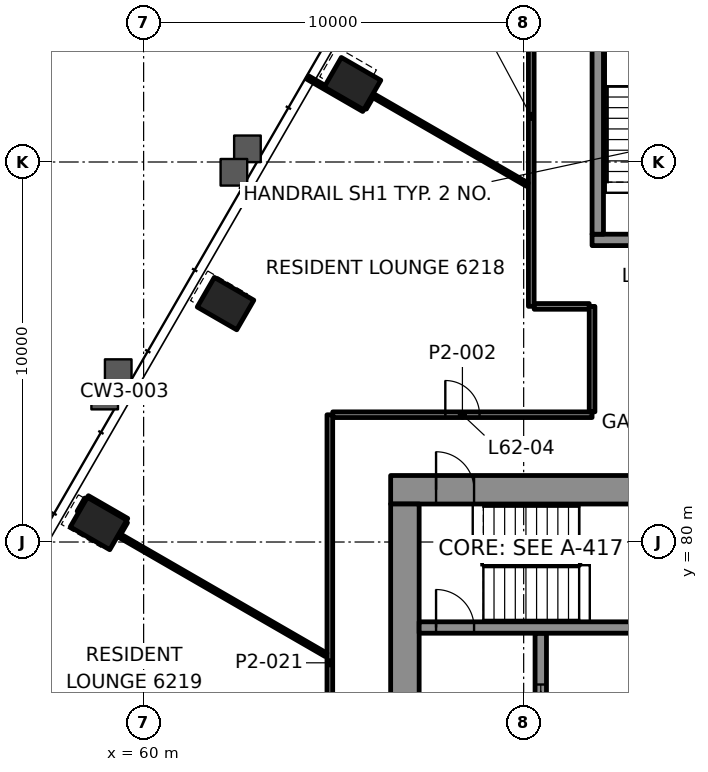
"""IFC4 building model, lengths in metres.
Left out: names, types, materials, properties, quantities, classifications, styles, units other than length and angle.
Written with IfcOpenShell. Run it as: python <this file> out.ifc"""

import sys

from ifc_helpers import new_model, si_unit, direction, frame, frame_2d, origin, origin_2d, place, context, subcontext, project, spatial, rectangle, hollow_rectangle, extrude, element, fill, save


model = new_model("IFC4")
c1 = context("Model", 3, precision=1e-05, world=origin(), true_north=direction((0.0, 1.0)))
c2 = subcontext(c1, "Body", "Model", "MODEL_VIEW")
j1 = project(units=[si_unit("LENGTHUNIT", "METRE"), si_unit("PLANEANGLEUNIT", "RADIAN")], contexts=[c1])
p1 = place(None, origin())
s1 = spatial("IfcSite", under=j1, at=p1, CompositionType="ELEMENT")
p2 = place(p1, origin())
s2 = spatial("IfcBuilding", under=s1, at=p2, CompositionType="ELEMENT")
p3 = place(p2, frame((0.0, 0.0, 263.6)))
s3 = spatial("IfcBuildingStorey", under=s2, at=p3, CompositionType="ELEMENT", Elevation=263.6)
for number, where, z_axis, x_axis in (
    (1, (65.497, 92.062, -0.0), (0.0, 0.0, 1.0), (-0.5, -0.866, 0.0)),
    (2, (62.156, 86.274, -0.0), (0.0, 0.0, 1.0), (-0.5, -0.866, 0.0)),
    (3, (58.814, 80.487, -0.0), (0.0, 0.0, 1.0), (-0.5, -0.866, 0.0)),
):
    element("IfcColumn", number, at=place(p3, frame(where, z_axis=z_axis, x_axis=x_axis)), inside=s3, PredefinedType="COLUMN", context=c2, shape_type="SweptSolid", body=[
        extrude(hollow_rectangle(XDim=0.9, YDim=1.2, WallThickness=0.06, at=origin_2d()), origin(), (0.0, 0.0, 1.0), 3.5),
    ])
p4 = place(p3, frame((66.5, 81.375, 0.0), z_axis=(0.0, 0.0, 1.0), x_axis=(1.0, 0.0, 0.0)))
e4 = element("IfcWall", 4, at=p4, inside=s3, PredefinedType="SHEAR", context=c2, shape_type="SweptSolid", body=[
    extrude(rectangle(XDim=17.0, YDim=0.75, at=frame_2d((8.5, 0.0))), origin(), (0.0, 0.0, 1.0), 3.3),
])
p5 = place(p4, frame((1.195, 0.0, 0.0)))
e5 = element("IfcOpeningElement", 5, at=p5, cuts=e4, PredefinedType="OPENING", context=c2, shape_type="SweptSolid", body=[
    extrude(rectangle(XDim=1.0, YDim=2.1, at=frame_2d((0.5, 1.05))), frame((0.0, 0.385, 0.0), z_axis=(0.0, -1.0, 0.0), x_axis=(1.0, 0.0, 0.0)), (0.0, 0.0, 1.0), 0.77),
])
p6 = place(p4, frame((15.005, 0.0, 0.0)))
e6 = element("IfcOpeningElement", 6, at=p6, cuts=e4, PredefinedType="OPENING", context=c2, shape_type="SweptSolid", body=[
    extrude(rectangle(XDim=1.0, YDim=2.1, at=frame_2d((0.5, 1.05))), frame((0.0, 0.385, 0.0), z_axis=(0.0, -1.0, 0.0), x_axis=(1.0, 0.0, 0.0)), (0.0, 0.0, 1.0), 0.77),
])
p7 = place(p4, frame((8.15, 0.0, 0.0)))
e7 = element("IfcOpeningElement", 7, at=p7, cuts=e4, PredefinedType="OPENING", context=c2, shape_type="SweptSolid", body=[
    extrude(rectangle(XDim=0.9, YDim=2.1, at=frame_2d((0.45, 1.05))), frame((0.0, 0.385, 0.0), z_axis=(0.0, -1.0, 0.0), x_axis=(1.0, 0.0, 0.0)), (0.0, 0.0, 1.0), 0.77),
])
p8 = place(p3, frame((66.875, 69.0, 0.0), z_axis=(0.0, 0.0, 1.0), x_axis=(0.0, 1.0, 0.0)))
e8 = element("IfcWall", 8, at=p8, inside=s3, PredefinedType="SHEAR", context=c2, shape_type="SweptSolid", body=[
    extrude(rectangle(XDim=12.0, YDim=0.75, at=frame_2d((6.0, 0.0))), origin(), (0.0, 0.0, 1.0), 3.3),
])
p9 = place(p8, frame((3.7, 0.0, 0.0)))
e9 = element("IfcOpeningElement", 9, at=p9, cuts=e8, PredefinedType="OPENING", context=c2, shape_type="SweptSolid", body=[
    extrude(rectangle(XDim=1.2, YDim=2.1, at=frame_2d((0.6, 1.05))), frame((0.0, 0.385, 0.0), z_axis=(0.0, -1.0, 0.0), x_axis=(1.0, 0.0, 0.0)), (0.0, 0.0, 1.0), 0.77),
])
p10 = place(p8, frame((0.925, 0.0, 0.0)))
e10 = element("IfcOpeningElement", 10, at=p10, cuts=e8, PredefinedType="OPENING", context=c2, shape_type="SweptSolid", body=[
    extrude(rectangle(XDim=0.9, YDim=2.1, at=frame_2d((0.45, 1.05))), frame((0.0, 0.385, 0.0), z_axis=(0.0, -1.0, 0.0), x_axis=(1.0, 0.0, 0.0)), (0.0, 0.0, 1.0), 0.77),
])
p11 = place(p3, frame((70.45, 75.0, 0.0), z_axis=(0.0, 0.0, 1.0), x_axis=(0.0, 1.0, 0.0)))
e11 = element("IfcWall", 11, at=p11, inside=s3, PredefinedType="SHEAR", context=c2, shape_type="SweptSolid", body=[
    extrude(rectangle(XDim=2.6, YDim=0.3, at=frame_2d((1.3, 0.0))), origin(), (0.0, 0.0, 1.0), 3.3),
])
p12 = place(p11, frame((0.15, 0.0, 0.0)))
e12 = element("IfcOpeningElement", 12, at=p12, cuts=e11, PredefinedType="OPENING", context=c2, shape_type="SweptSolid", body=[
    extrude(rectangle(XDim=1.1, YDim=2.1, at=frame_2d((0.55, 1.05))), frame((0.0, 0.16, 0.0), z_axis=(0.0, -1.0, 0.0), x_axis=(1.0, 0.0, 0.0)), (0.0, 0.0, 1.0), 0.32),
])
p13 = place(p3, frame((67.25, 77.75, 0.0), z_axis=(0.0, 0.0, 1.0), x_axis=(1.0, 0.0, 0.0)))
e13 = element("IfcWall", 13, at=p13, inside=s3, PredefinedType="SHEAR", context=c2, shape_type="SweptSolid", body=[
    extrude(rectangle(XDim=15.5, YDim=0.3, at=frame_2d((7.75, 0.0))), origin(), (0.0, 0.0, 1.0), 3.3),
])
p14 = place(p13, frame((0.445, 0.0, 0.0)))
e14 = element("IfcOpeningElement", 14, at=p14, cuts=e13, PredefinedType="OPENING", context=c2, shape_type="SweptSolid", body=[
    extrude(rectangle(XDim=1.0, YDim=2.1, at=frame_2d((0.5, 1.05))), frame((0.0, 0.16, 0.0), z_axis=(0.0, -1.0, 0.0), x_axis=(1.0, 0.0, 0.0)), (0.0, 0.0, 1.0), 0.32),
])
p15 = place(p3, frame((71.8, 87.95, 0.0), z_axis=(0.0, 0.0, 1.0), x_axis=(1.0, 0.0, 0.0)))
e15 = element("IfcWall", 15, at=p15, inside=s3, PredefinedType="SHEAR", context=c2, shape_type="SweptSolid", body=[
    extrude(rectangle(XDim=6.4, YDim=0.3, at=frame_2d((3.2, 0.0))), origin(), (0.0, 0.0, 1.0), 3.3),
])
p16 = place(p15, frame((1.325, 0.0, 0.0)))
e16 = element("IfcOpeningElement", 16, at=p16, cuts=e15, PredefinedType="OPENING", context=c2, shape_type="SweptSolid", body=[
    extrude(rectangle(XDim=1.0, YDim=2.1, at=frame_2d((0.5, 1.05))), frame((0.0, 0.16, 0.0), z_axis=(0.0, -1.0, 0.0), x_axis=(1.0, 0.0, 0.0)), (0.0, 0.0, 1.0), 0.32),
])
p17 = place(p15, frame((4.125, 0.0, 0.0)))
e17 = element("IfcOpeningElement", 17, at=p17, cuts=e15, PredefinedType="OPENING", context=c2, shape_type="SweptSolid", body=[
    extrude(rectangle(XDim=1.2, YDim=2.1, at=frame_2d((0.6, 1.05))), frame((0.0, 0.16, 0.0), z_axis=(0.0, -1.0, 0.0), x_axis=(1.0, 0.0, 0.0)), (0.0, 0.0, 1.0), 0.32),
])
p18 = place(p3, frame((71.95, 88.1, 0.0), z_axis=(0.0, 0.0, 1.0), x_axis=(0.0, 1.0, 0.0)))
e18 = element("IfcWall", 18, at=p18, inside=s3, PredefinedType="SHEAR", context=c2, shape_type="SweptSolid", body=[
    extrude(rectangle(XDim=6.2, YDim=0.3, at=frame_2d((3.1, 0.0))), origin(), (0.0, 0.0, 1.0), 3.3),
])
p19 = place(p3, frame((64.977, 83.35, 0.0), z_axis=(0.0, 0.0, 1.0), x_axis=(1.0, 0.0, 0.0)))
e19 = element("IfcWall", 19, at=p19, inside=s3, PredefinedType="PARTITIONING", context=c2, shape_type="SweptSolid", body=[
    extrude(rectangle(XDim=6.823, YDim=0.15, at=frame_2d((3.412, 0.0))), origin(), (0.0, 0.0, 1.0), 2.7),
])
p20 = place(p19, frame((2.961, 0.0, 0.0)))
e20 = element("IfcOpeningElement", 20, at=p20, cuts=e19, PredefinedType="OPENING", context=c2, shape_type="SweptSolid", body=[
    extrude(rectangle(XDim=0.9, YDim=2.1, at=frame_2d((0.45, 1.05))), frame((0.0, 0.085, 0.0), z_axis=(0.0, -1.0, 0.0), x_axis=(1.0, 0.0, 0.0)), (0.0, 0.0, 1.0), 0.17),
])
p21 = place(p3, frame((70.277, 86.2, 0.0), z_axis=(0.0, 0.0, 1.0), x_axis=(1.0, 0.0, 0.0)))
e21 = element("IfcWall", 21, at=p21, inside=s3, PredefinedType="PARTITIONING", context=c2, shape_type="SweptSolid", body=[
    extrude(rectangle(XDim=1.448, YDim=0.15, at=frame_2d((0.724, 0.0))), origin(), (0.0, 0.0, 1.0), 2.7),
])
p22 = place(p3, frame((59.359, 80.23, 0.0), z_axis=(0.0, 0.0, 1.0), x_axis=(0.499539972301, 0.866290838041, 0.0)))
e22 = element("IfcWall", 22, at=p22, inside=s3, PredefinedType="PARTITIONING", context=c2, shape_type="SweptSolid", body=[
    extrude(rectangle(XDim=0.347, YDim=0.1, at=frame_2d((0.174, 0.0))), origin(), (0.0, 0.0, 1.0), 2.7),
])
p23 = place(p3, frame((65.817, 91.417, 0.0), z_axis=(0.0, 0.0, 1.0), x_axis=(0.499985493453, 0.866033778982, 0.0)))
e23 = element("IfcWall", 23, at=p23, inside=s3, PredefinedType="PARTITIONING", context=c2, shape_type="SweptSolid", body=[
    extrude(rectangle(XDim=0.348, YDim=0.1, at=frame_2d((0.174, 0.0))), origin(), (0.0, 0.0, 1.0), 2.7),
])
p24 = place(p3, frame((58.294, 80.787, 0.0), z_axis=(0.0, 0.0, 1.0), x_axis=(0.500165123728, 0.865930048564, 0.0)))
e24 = element("IfcWall", 24, at=p24, inside=s3, PredefinedType="PARTITIONING", context=c2, shape_type="SweptSolid", body=[
    extrude(rectangle(XDim=0.398, YDim=0.1, at=frame_2d((0.199, 0.0))), origin(), (0.0, 0.0, 1.0), 2.7),
])
p25 = place(p3, frame((71.8, 83.425, 0.0), z_axis=(0.0, 0.0, 1.0), x_axis=(0.0, 1.0, 0.0)))
e25 = element("IfcWall", 25, at=p25, inside=s3, PredefinedType="PARTITIONING", context=c2, shape_type="SweptSolid", body=[
    extrude(rectangle(XDim=2.775, YDim=0.15, at=frame_2d((1.387, 0.0))), origin(), (0.0, 0.0, 1.0), 2.697),
])
p26 = place(p3, frame((70.2, 86.202, 0.0), z_axis=(0.0, 0.0, 1.0), x_axis=(0.0, 1.0, 0.0)))
e26 = element("IfcWall", 26, at=p26, inside=s3, PredefinedType="PARTITIONING", context=c2, shape_type="SweptSolid", body=[
    extrude(rectangle(XDim=9.998, YDim=0.15, at=frame_2d((4.999, 0.0))), origin(), (0.0, 0.0, 1.0), 2.7),
])
p27 = place(p3, frame((64.9, 70.295, 0.0), z_axis=(0.0, 0.0, 1.0), x_axis=(0.0, 1.0, 0.0)))
e27 = element("IfcWall", 27, at=p27, inside=s3, PredefinedType="PARTITIONING", context=c2, shape_type="SweptSolid", body=[
    extrude(rectangle(XDim=13.053, YDim=0.15, at=frame_2d((6.527, 0.0))), origin(), (0.0, 0.0, 1.0), 2.7),
])
p28 = place(p27, frame((2.963, 0.0, 0.0)))
e28 = element("IfcOpeningElement", 28, at=p28, cuts=e27, PredefinedType="OPENING", context=c2, shape_type="SweptSolid", body=[
    extrude(rectangle(XDim=1.0, YDim=2.1, at=frame_2d((0.5, 1.05))), frame((0.0, 0.085, 0.0), z_axis=(0.0, -1.0, 0.0), x_axis=(1.0, 0.0, 0.0)), (0.0, 0.0, 1.0), 0.17),
])
p29 = place(p3, frame((70.099, 89.404, 0.0), z_axis=(0.0, 0.0, 1.0), x_axis=(-0.866026044032, 0.499998891056, 0.0)))
e29 = element("IfcWall", 29, at=p29, inside=s3, PredefinedType="PARTITIONING", context=c2, shape_type="SweptSolid", body=[
    extrude(rectangle(XDim=4.714, YDim=0.1, at=frame_2d((2.357, 0.0))), origin(), (0.0, 0.0, 1.0), 2.7),
])
p30 = place(p3, frame((65.79, 91.373, 0.0), z_axis=(0.0, 0.0, 1.0), x_axis=(-0.866085039529, 0.499896693632, 0.0)))
e30 = element("IfcWall", 30, at=p30, inside=s3, PredefinedType="PARTITIONING", context=c2, shape_type="SweptSolid", body=[
    extrude(rectangle(XDim=1.698, YDim=0.1, at=frame_2d((0.849, 0.0))), origin(), (0.0, 0.0, 1.0), 2.688),
])
p31 = place(p3, frame((59.557, 80.578, 0.0), z_axis=(0.0, 0.0, 1.0), x_axis=(-0.866035997947, 0.499981649923, 0.0)))
e31 = element("IfcWall", 31, at=p31, inside=s3, PredefinedType="PARTITIONING", context=c2, shape_type="SweptSolid", body=[
    extrude(rectangle(XDim=1.196, YDim=0.1, at=frame_2d((0.598, 0.0))), origin(), (0.0, 0.0, 1.0), 2.688),
])
p32 = place(p3, frame((64.799, 77.032, 0.0), z_axis=(0.0, 0.0, 1.0), x_axis=(-0.866032246126, 0.49998814853, 0.0)))
e32 = element("IfcWall", 32, at=p32, inside=s3, PredefinedType="PARTITIONING", context=c2, shape_type="SweptSolid", body=[
    extrude(rectangle(XDim=6.31, YDim=0.1, at=frame_2d((3.155, 0.0))), origin(), (0.0, 0.0, 1.0), 2.7),
])
p33 = place(p3, frame((64.799, 70.601, 0.0), z_axis=(0.0, 0.0, 1.0), x_axis=(-0.86602224969, 0.500005463012, 0.0)))
e33 = element("IfcWall", 33, at=p33, inside=s3, PredefinedType="PARTITIONING", context=c2, shape_type="SweptSolid", body=[
    extrude(rectangle(XDim=11.226, YDim=0.1, at=frame_2d((5.613, 0.0))), origin(), (0.0, 0.0, 1.0), 2.688),
])
p34 = place(p20, origin())
e34 = element("IfcDoor", 34, at=p34, inside=s3, OperationType="SINGLE_SWING_LEFT", PredefinedType="DOOR", context=c2, shape_type="SweptSolid", body=[
    extrude(rectangle(XDim=0.9, YDim=2.1, at=frame_2d((0.45, 1.05))), frame((0.0, 0.025, 0.0), z_axis=(0.0, -1.0, 0.0), x_axis=(1.0, 0.0, 0.0)), (0.0, 0.0, 1.0), 0.05),
])
fill(e20, e34)
p35 = place(p12, origin())
e35 = element("IfcDoor", 35, at=p35, inside=s3, OperationType="DOUBLE_DOOR_SLIDING", PredefinedType="DOOR", context=c2, shape_type="SweptSolid", body=[
    extrude(rectangle(XDim=1.1, YDim=2.1, at=frame_2d((0.55, 1.05))), frame((0.0, 0.025, 0.0), z_axis=(0.0, -1.0, 0.0), x_axis=(1.0, 0.0, 0.0)), (0.0, 0.0, 1.0), 0.05),
])
fill(e12, e35)
p36 = place(p14, origin())
e36 = element("IfcDoor", 36, at=p36, inside=s3, OperationType="SINGLE_SWING_LEFT", PredefinedType="DOOR", context=c2, shape_type="SweptSolid", body=[
    extrude(rectangle(XDim=1.0, YDim=2.1, at=frame_2d((0.5, 1.05))), frame((0.0, 0.025, 0.0), z_axis=(0.0, -1.0, 0.0), x_axis=(1.0, 0.0, 0.0)), (0.0, 0.0, 1.0), 0.05),
])
fill(e14, e36)
p37 = place(p5, origin())
e37 = element("IfcDoor", 37, at=p37, inside=s3, OperationType="SINGLE_SWING_RIGHT", PredefinedType="DOOR", context=c2, shape_type="SweptSolid", body=[
    extrude(rectangle(XDim=1.0, YDim=2.1, at=frame_2d((0.5, 1.05))), frame((0.0, 0.095, 0.0), z_axis=(0.0, -1.0, 0.0), x_axis=(1.0, 0.0, 0.0)), (0.0, 0.0, 1.0), 0.19),
])
fill(e5, e37)
save(model, sys.argv[1])
